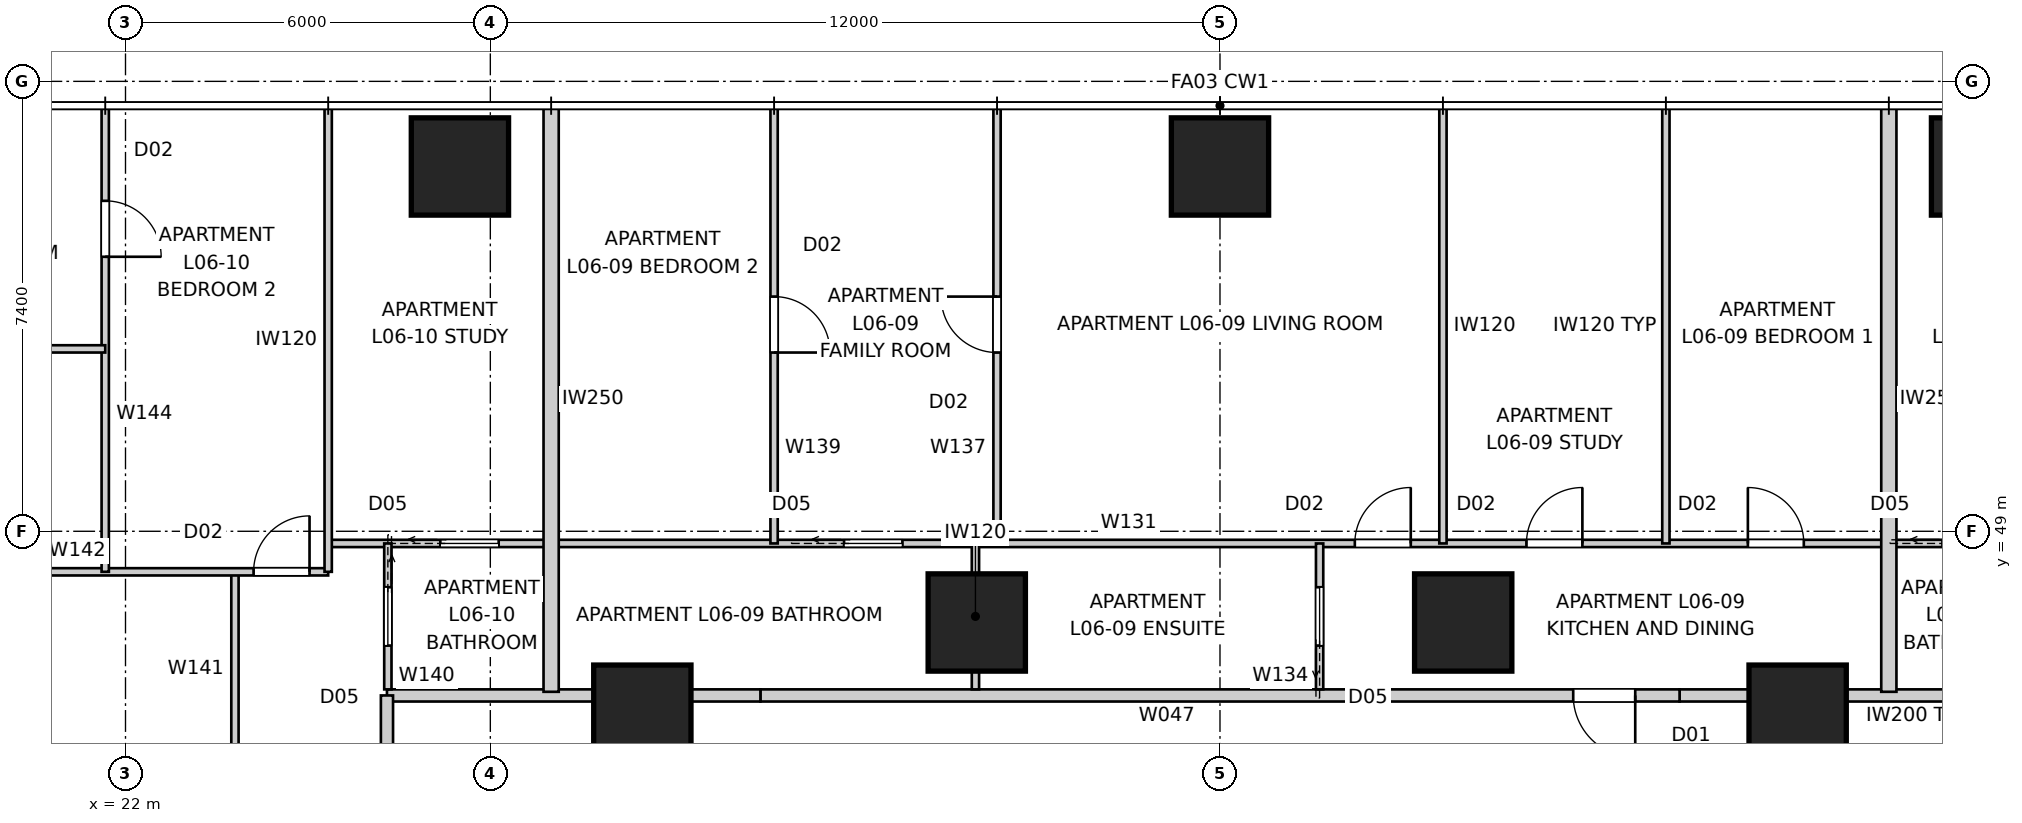
"""IFC4 building model, lengths in metres.
Left out: names, types, materials, properties, quantities, classifications, styles, units other than length and angle.
Written with IfcOpenShell. Run it as: python <this file> out.ifc"""

import sys

from ifc_helpers import new_model, si_unit, direction, frame, frame_2d, origin, origin_2d, place, context, subcontext, project, spatial, rectangle, extrude, element, fill, save


model = new_model("IFC4")
c1 = context("Model", 3, precision=1e-05, world=origin(), true_north=direction((0.0, 1.0)))
c2 = subcontext(c1, "Body", "Model", "MODEL_VIEW")
j1 = project(units=[si_unit("LENGTHUNIT", "METRE"), si_unit("PLANEANGLEUNIT", "RADIAN")], contexts=[c1])
p1 = place(None, origin())
s1 = spatial("IfcSite", under=j1, at=p1, CompositionType="ELEMENT")
p2 = place(p1, origin())
s2 = spatial("IfcBuilding", under=s1, at=p2, CompositionType="ELEMENT")
p3 = place(p2, frame((0.0, 0.0, 25.2)))
s3 = spatial("IfcBuildingStorey", under=s2, at=p3, CompositionType="ELEMENT", Elevation=25.2)
for number, where, z_axis, x_axis in (
    (1, (52.5, 55.0, 0.0), (0.0, 0.0, 1.0), (1.0, 0.0, 0.0)),
    (2, (40.0, 55.0, 0.0), (0.0, 0.0, 1.0), (1.0, 0.0, 0.0)),
    (3, (27.5, 55.0, 0.0), (0.0, 0.0, 1.0), (1.0, 0.0, 0.0)),
    (4, (49.5, 46.0, 0.0), (0.0, 0.0, 1.0), (1.0, 0.0, 0.0)),
    (5, (44.0, 47.5, 0.0), (0.0, 0.0, 1.0), (1.0, 0.0, 0.0)),
    (6, (36.0, 47.5, 0.0), (0.0, 0.0, 1.0), (1.0, 0.0, 0.0)),
    (7, (30.5, 46.0, 0.0), (0.0, 0.0, 1.0), (1.0, 0.0, 0.0)),
):
    element("IfcColumn", number, at=place(p3, frame(where, z_axis=z_axis, x_axis=x_axis)), inside=s3, PredefinedType="COLUMN", context=c2, shape_type="SweptSolid", body=[
        extrude(rectangle(XDim=1.6, YDim=1.6, at=origin_2d()), origin(), (0.0, 0.0, 1.0), 3.4),
    ])
p4 = place(p3, frame((53.7, 46.3, 0.0), z_axis=(0.0, 0.0, 1.0), x_axis=(-1.0, 0.0, 0.0)))
e8 = element("IfcWall", 8, at=p4, inside=s3, PredefinedType="PARTITIONING", context=c2, shape_type="SweptSolid", body=[
    extrude(rectangle(XDim=4.458, YDim=0.2, at=frame_2d((2.229, 0.0))), origin(), (0.0, 0.0, 1.0), 3.25),
])
p5 = place(p3, frame((49.242, 46.3, 0.0), z_axis=(0.0, 0.0, 1.0), x_axis=(-1.0, 0.0, 0.0)))
e9 = element("IfcWall", 9, at=p5, inside=s3, PredefinedType="PARTITIONING", context=c2, shape_type="SweptSolid", body=[
    extrude(rectangle(XDim=1.683, YDim=0.2, at=frame_2d((0.842, 0.0))), origin(), (0.0, 0.0, 1.0), 2.55),
])
p6 = place(p3, frame((47.558, 46.3, 0.0), z_axis=(0.0, 0.0, 1.0), x_axis=(-1.0, 0.0, 0.0)))
e10 = element("IfcWall", 10, at=p6, inside=s3, PredefinedType="PARTITIONING", context=c2, shape_type="SweptSolid", body=[
    extrude(rectangle(XDim=15.117, YDim=0.2, at=frame_2d((7.558, 0.0))), origin(), (0.0, 0.0, 1.0), 3.25),
])
p7 = place(p6, frame((0.729, 0.0, 0.0)))
e11 = element("IfcOpeningElement", 11, at=p7, cuts=e10, PredefinedType="OPENING", context=c2, shape_type="SweptSolid", body=[
    extrude(rectangle(XDim=1.02, YDim=2.34, at=frame_2d((0.51, 1.17))), frame((0.0, 0.11, 0.0), z_axis=(0.0, -1.0, 0.0), x_axis=(1.0, 0.0, 0.0)), (0.0, 0.0, 1.0), 0.22),
])
p8 = place(p3, frame((32.442, 46.3, 0.0), z_axis=(0.0, 0.0, 1.0), x_axis=(-1.0, 0.0, 0.0)))
e12 = element("IfcWall", 12, at=p8, inside=s3, PredefinedType="PARTITIONING", context=c2, shape_type="SweptSolid", body=[
    extrude(rectangle(XDim=1.683, YDim=0.2, at=frame_2d((0.842, 0.0))), origin(), (0.0, 0.0, 1.0), 2.55),
])
p9 = place(p3, frame((30.758, 46.3, 0.0), z_axis=(0.0, 0.0, 1.0), x_axis=(-1.0, 0.0, 0.0)))
e13 = element("IfcWall", 13, at=p9, inside=s3, PredefinedType="PARTITIONING", context=c2, shape_type="SweptSolid", body=[
    extrude(rectangle(XDim=4.458, YDim=0.2, at=frame_2d((2.229, 0.0))), origin(), (0.0, 0.0, 1.0), 3.25),
])
p10 = place(p3, frame((26.3, 46.3, 0.0), z_axis=(0.0, 0.0, 1.0), x_axis=(0.0, -1.0, 0.0)))
e14 = element("IfcWall", 14, at=p10, inside=s3, PredefinedType="PARTITIONING", context=c2, shape_type="SweptSolid", body=[
    extrude(rectangle(XDim=32.6, YDim=0.2, at=frame_2d((16.3, 0.0))), origin(), (0.0, 0.0, 1.0), 3.25),
])
p11 = place(p10, frame((2.315, 0.0, 0.0)))
e15 = element("IfcOpeningElement", 15, at=p11, cuts=e14, PredefinedType="OPENING", context=c2, shape_type="SweptSolid", body=[
    extrude(rectangle(XDim=1.02, YDim=2.34, at=frame_2d((0.51, 1.17))), frame((0.0, 0.11, 0.0), z_axis=(0.0, -1.0, 0.0), x_axis=(1.0, 0.0, 0.0)), (0.0, 0.0, 1.0), 0.22),
])
p12 = place(p10, frame((10.624, 0.0, 0.0)))
e16 = element("IfcOpeningElement", 16, at=p12, cuts=e14, PredefinedType="OPENING", context=c2, shape_type="SweptSolid", body=[
    extrude(rectangle(XDim=1.02, YDim=2.34, at=frame_2d((0.51, 1.17))), frame((0.0, 0.11, 0.0), z_axis=(0.0, -1.0, 0.0), x_axis=(1.0, 0.0, 0.0)), (0.0, 0.0, 1.0), 0.22),
])
p13 = place(p10, frame((17.848, 0.0, 0.0)))
e17 = element("IfcOpeningElement", 17, at=p13, cuts=e14, PredefinedType="OPENING", context=c2, shape_type="SweptSolid", body=[
    extrude(rectangle(XDim=1.02, YDim=2.34, at=frame_2d((0.51, 1.17))), frame((0.0, 0.11, 0.0), z_axis=(0.0, -1.0, 0.0), x_axis=(1.0, 0.0, 0.0)), (0.0, 0.0, 1.0), 0.22),
])
p14 = place(p10, frame((30.516, 0.0, 0.0)))
e18 = element("IfcOpeningElement", 18, at=p14, cuts=e14, PredefinedType="OPENING", context=c2, shape_type="SweptSolid", body=[
    extrude(rectangle(XDim=1.02, YDim=2.34, at=frame_2d((0.51, 1.17))), frame((0.0, 0.11, 0.0), z_axis=(0.0, -1.0, 0.0), x_axis=(1.0, 0.0, 0.0)), (0.0, 0.0, 1.0), 0.22),
])
for number, where, z_axis, x_axis in (
    (19, (51.0, 56.0, 0.0), (0.0, 0.0, 1.0), (0.0, -1.0, 0.0)),
    (20, (29.0, 56.0, 0.0), (0.0, 0.0, 1.0), (0.0, -1.0, 0.0)),
):
    element("IfcWall", number, at=place(p3, frame(where, z_axis=z_axis, x_axis=x_axis)), inside=s3, PredefinedType="PARTITIONING", context=c2, shape_type="SweptSolid", body=[
        extrude(rectangle(XDim=9.64, YDim=0.25, at=frame_2d((4.82, 0.0))), origin(), (0.0, 0.0, 1.0), 3.25),
    ])
p15 = place(p3, frame((25.333, 48.8, 0.0), z_axis=(0.0, 0.0, 1.0), x_axis=(1.0, 0.0, 0.0)))
e21 = element("IfcWall", 21, at=p15, inside=s3, PredefinedType="PARTITIONING", context=c2, shape_type="SweptSolid", body=[
    extrude(rectangle(XDim=29.333, YDim=0.12, at=frame_2d((14.667, 0.0))), origin(), (0.0, 0.0, 1.0), 3.25),
])
p16 = place(p15, frame((19.707, 0.0, 0.0)))
e22 = element("IfcOpeningElement", 22, at=p16, cuts=e21, PredefinedType="OPENING", context=c2, shape_type="SweptSolid", body=[
    extrude(rectangle(XDim=0.92, YDim=2.34, at=frame_2d((0.46, 1.17))), frame((0.0, 0.07, 0.0), z_axis=(0.0, -1.0, 0.0), x_axis=(1.0, 0.0, 0.0)), (0.0, 0.0, 1.0), 0.14),
])
p17 = place(p15, frame((23.348, 0.0, 0.0)))
e23 = element("IfcOpeningElement", 23, at=p17, cuts=e21, PredefinedType="OPENING", context=c2, shape_type="SweptSolid", body=[
    extrude(rectangle(XDim=0.92, YDim=2.34, at=frame_2d((0.46, 1.17))), frame((0.0, 0.07, 0.0), z_axis=(0.0, -1.0, 0.0), x_axis=(1.0, 0.0, 0.0)), (0.0, 0.0, 1.0), 0.14),
])
p18 = place(p15, frame((16.884, 0.0, 0.0)))
e24 = element("IfcOpeningElement", 24, at=p18, cuts=e21, PredefinedType="OPENING", context=c2, shape_type="SweptSolid", body=[
    extrude(rectangle(XDim=0.92, YDim=2.34, at=frame_2d((0.46, 1.17))), frame((0.0, 0.07, 0.0), z_axis=(0.0, -1.0, 0.0), x_axis=(1.0, 0.0, 0.0)), (0.0, 0.0, 1.0), 0.14),
])
p19 = place(p15, frame((26.549, 0.0, 0.0)))
e25 = element("IfcOpeningElement", 25, at=p19, cuts=e21, PredefinedType="OPENING", context=c2, shape_type="SweptSolid", body=[
    extrude(rectangle(XDim=0.96, YDim=2.1, at=frame_2d((0.48, 1.05))), frame((0.0, 0.07, 0.0), z_axis=(0.0, -1.0, 0.0), x_axis=(1.0, 0.0, 0.0)), (0.0, 0.0, 1.0), 0.14),
])
p20 = place(p15, frame((1.844, 0.0, 0.0)))
e26 = element("IfcOpeningElement", 26, at=p20, cuts=e21, PredefinedType="OPENING", context=c2, shape_type="SweptSolid", body=[
    extrude(rectangle(XDim=0.96, YDim=2.1, at=frame_2d((0.48, 1.05))), frame((0.0, 0.07, 0.0), z_axis=(0.0, -1.0, 0.0), x_axis=(1.0, 0.0, 0.0)), (0.0, 0.0, 1.0), 0.14),
])
p21 = place(p15, frame((8.484, 0.0, 0.0)))
e27 = element("IfcOpeningElement", 27, at=p21, cuts=e21, PredefinedType="OPENING", context=c2, shape_type="SweptSolid", body=[
    extrude(rectangle(XDim=0.96, YDim=2.1, at=frame_2d((0.48, 1.05))), frame((0.0, 0.07, 0.0), z_axis=(0.0, -1.0, 0.0), x_axis=(1.0, 0.0, 0.0)), (0.0, 0.0, 1.0), 0.14),
])
p22 = place(p3, frame((41.638, 46.4, 0.0), z_axis=(0.0, 0.0, 1.0), x_axis=(0.0, 1.0, 0.0)))
e28 = element("IfcWall", 28, at=p22, inside=s3, PredefinedType="PARTITIONING", context=c2, shape_type="SweptSolid", body=[
    extrude(rectangle(XDim=2.4, YDim=0.12, at=frame_2d((1.2, 0.0))), origin(), (0.0, 0.0, 1.0), 3.25),
])
p23 = place(p22, frame((0.72, 0.0, 0.0)))
e29 = element("IfcOpeningElement", 29, at=p23, cuts=e28, PredefinedType="OPENING", context=c2, shape_type="SweptSolid", body=[
    extrude(rectangle(XDim=0.96, YDim=2.1, at=frame_2d((0.48, 1.05))), frame((0.0, 0.07, 0.0), z_axis=(0.0, -1.0, 0.0), x_axis=(1.0, 0.0, 0.0)), (0.0, 0.0, 1.0), 0.14),
])
p24 = place(p3, frame((35.978, 48.8, 0.0), z_axis=(0.0, 0.0, 1.0), x_axis=(0.0, -1.0, 0.0)))
e30 = element("IfcWall", 30, at=p24, inside=s3, PredefinedType="PARTITIONING", context=c2, shape_type="SweptSolid", body=[
    extrude(rectangle(XDim=2.4, YDim=0.12, at=frame_2d((1.2, 0.0))), origin(), (0.0, 0.0, 1.0), 3.25),
])
p25 = place(p3, frame((43.667, 55.96, 0.0), z_axis=(0.0, 0.0, 1.0), x_axis=(0.0, -1.0, 0.0)))
e31 = element("IfcWall", 31, at=p25, inside=s3, PredefinedType="PARTITIONING", context=c2, shape_type="SweptSolid", body=[
    extrude(rectangle(XDim=7.16, YDim=0.12, at=frame_2d((3.58, 0.0))), origin(), (0.0, 0.0, 1.0), 3.25),
])
p26 = place(p3, frame((36.333, 48.8, 0.0), z_axis=(0.0, 0.0, 1.0), x_axis=(0.0, 1.0, 0.0)))
e32 = element("IfcWall", 32, at=p26, inside=s3, PredefinedType="PARTITIONING", context=c2, shape_type="SweptSolid", body=[
    extrude(rectangle(XDim=7.16, YDim=0.12, at=frame_2d((3.58, 0.0))), origin(), (0.0, 0.0, 1.0), 3.25),
])
p27 = place(p26, frame((3.14, 0.0, 0.0)))
e33 = element("IfcOpeningElement", 33, at=p27, cuts=e32, PredefinedType="OPENING", context=c2, shape_type="SweptSolid", body=[
    extrude(rectangle(XDim=0.92, YDim=2.34, at=frame_2d((0.46, 1.17))), frame((0.0, 0.07, 0.0), z_axis=(0.0, -1.0, 0.0), x_axis=(1.0, 0.0, 0.0)), (0.0, 0.0, 1.0), 0.14),
])
p28 = place(p3, frame((47.333, 48.8, 0.0), z_axis=(0.0, 0.0, 1.0), x_axis=(0.0, 1.0, 0.0)))
e34 = element("IfcWall", 34, at=p28, inside=s3, PredefinedType="PARTITIONING", context=c2, shape_type="SweptSolid", body=[
    extrude(rectangle(XDim=7.16, YDim=0.12, at=frame_2d((3.58, 0.0))), origin(), (0.0, 0.0, 1.0), 3.25),
])
p29 = place(p3, frame((32.667, 55.96, 0.0), z_axis=(0.0, 0.0, 1.0), x_axis=(0.0, -1.0, 0.0)))
e35 = element("IfcWall", 35, at=p29, inside=s3, PredefinedType="PARTITIONING", context=c2, shape_type="SweptSolid", body=[
    extrude(rectangle(XDim=7.16, YDim=0.12, at=frame_2d((3.58, 0.0))), origin(), (0.0, 0.0, 1.0), 3.25),
])
p30 = place(p29, frame((3.1, 0.0, 0.0)))
e36 = element("IfcOpeningElement", 36, at=p30, cuts=e35, PredefinedType="OPENING", context=c2, shape_type="SweptSolid", body=[
    extrude(rectangle(XDim=0.92, YDim=2.34, at=frame_2d((0.46, 1.17))), frame((0.0, 0.07, 0.0), z_axis=(0.0, -1.0, 0.0), x_axis=(1.0, 0.0, 0.0)), (0.0, 0.0, 1.0), 0.14),
])
p31 = place(p3, frame((26.315, 48.8, 0.0), z_axis=(0.0, 0.0, 1.0), x_axis=(0.0, -1.0, 0.0)))
e37 = element("IfcWall", 37, at=p31, inside=s3, PredefinedType="PARTITIONING", context=c2, shape_type="SweptSolid", body=[
    extrude(rectangle(XDim=2.4, YDim=0.12, at=frame_2d((1.2, 0.0))), origin(), (0.0, 0.0, 1.0), 3.25),
])
p32 = place(p31, frame((0.72, 0.0, 0.0)))
e38 = element("IfcOpeningElement", 38, at=p32, cuts=e37, PredefinedType="OPENING", context=c2, shape_type="SweptSolid", body=[
    extrude(rectangle(XDim=0.96, YDim=2.1, at=frame_2d((0.48, 1.05))), frame((0.0, 0.07, 0.0), z_axis=(0.0, -1.0, 0.0), x_axis=(1.0, 0.0, 0.0)), (0.0, 0.0, 1.0), 0.14),
])
p33 = place(p3, frame((23.8, 41.0, 0.0), z_axis=(0.0, 0.0, 1.0), x_axis=(0.0, 1.0, 0.0)))
e39 = element("IfcWall", 39, at=p33, inside=s3, PredefinedType="PARTITIONING", context=c2, shape_type="SweptSolid", body=[
    extrude(rectangle(XDim=7.333, YDim=0.12, at=frame_2d((3.667, 0.0))), origin(), (0.0, 0.0, 1.0), 3.25),
])
p34 = place(p33, frame((3.207, 0.0, 0.0)))
e40 = element("IfcOpeningElement", 40, at=p34, cuts=e39, PredefinedType="OPENING", context=c2, shape_type="SweptSolid", body=[
    extrude(rectangle(XDim=0.92, YDim=2.34, at=frame_2d((0.46, 1.17))), frame((0.0, 0.07, 0.0), z_axis=(0.0, -1.0, 0.0), x_axis=(1.0, 0.0, 0.0)), (0.0, 0.0, 1.0), 0.14),
])
p35 = place(p3, frame((14.04, 48.333, 0.0), z_axis=(0.0, 0.0, 1.0), x_axis=(1.0, 0.0, 0.0)))
e41 = element("IfcWall", 41, at=p35, inside=s3, PredefinedType="PARTITIONING", context=c2, shape_type="SweptSolid", body=[
    extrude(rectangle(XDim=11.293, YDim=0.12, at=frame_2d((5.646, 0.0))), origin(), (0.0, 0.0, 1.0), 3.25),
])
p36 = place(p35, frame((10.067, 0.0, 0.0)))
e42 = element("IfcOpeningElement", 42, at=p36, cuts=e41, PredefinedType="OPENING", context=c2, shape_type="SweptSolid", body=[
    extrude(rectangle(XDim=0.92, YDim=2.34, at=frame_2d((0.46, 1.17))), frame((0.0, 0.07, 0.0), z_axis=(0.0, -1.0, 0.0), x_axis=(1.0, 0.0, 0.0)), (0.0, 0.0, 1.0), 0.14),
])
p37 = place(p35, frame((3.358, 0.0, 0.0)))
e43 = element("IfcOpeningElement", 43, at=p37, cuts=e41, PredefinedType="OPENING", context=c2, shape_type="SweptSolid", body=[
    extrude(rectangle(XDim=0.92, YDim=2.34, at=frame_2d((0.46, 1.17))), frame((0.0, 0.07, 0.0), z_axis=(0.0, -1.0, 0.0), x_axis=(1.0, 0.0, 0.0)), (0.0, 0.0, 1.0), 0.14),
])
p38 = place(p3, frame((25.333, 48.333, 0.0), z_axis=(0.0, 0.0, 1.0), x_axis=(0.0, 1.0, 0.0)))
e44 = element("IfcWall", 44, at=p38, inside=s3, PredefinedType="PARTITIONING", context=c2, shape_type="SweptSolid", body=[
    extrude(rectangle(XDim=7.627, YDim=0.12, at=frame_2d((3.813, 0.0))), origin(), (0.0, 0.0, 1.0), 2.637),
])
p39 = place(p3, frame((21.667, 55.96, 0.0), z_axis=(0.0, 0.0, 1.0), x_axis=(0.0, -1.0, 0.0)))
e45 = element("IfcWall", 45, at=p39, inside=s3, PredefinedType="PARTITIONING", context=c2, shape_type="SweptSolid", body=[
    extrude(rectangle(XDim=7.627, YDim=0.12, at=frame_2d((3.813, 0.0))), origin(), (0.0, 0.0, 1.0), 3.25),
])
p40 = place(p39, frame((1.525, 0.0, 0.0)))
e46 = element("IfcOpeningElement", 46, at=p40, cuts=e45, PredefinedType="OPENING", context=c2, shape_type="SweptSolid", body=[
    extrude(rectangle(XDim=0.92, YDim=2.34, at=frame_2d((0.46, 1.17))), frame((0.0, 0.07, 0.0), z_axis=(0.0, -1.0, 0.0), x_axis=(1.0, 0.0, 0.0)), (0.0, 0.0, 1.0), 0.14),
])
p41 = place(p3, frame((18.04, 52.0, 0.0), z_axis=(0.0, 0.0, 1.0), x_axis=(1.0, 0.0, 0.0)))
e47 = element("IfcWall", 47, at=p41, inside=s3, PredefinedType="PARTITIONING", context=c2, shape_type="SweptSolid", body=[
    extrude(rectangle(XDim=3.627, YDim=0.12, at=frame_2d((1.813, 0.0))), origin(), (0.0, 0.0, 1.0), 3.25),
])
p42 = place(p7, origin())
e48 = element("IfcDoor", 48, at=p42, inside=s3, OperationType="SINGLE_SWING_LEFT", PredefinedType="DOOR", context=c2, shape_type="SweptSolid", body=[
    extrude(rectangle(XDim=1.02, YDim=2.34, at=frame_2d((0.51, 1.17))), frame((0.0, 0.025, 0.0), z_axis=(0.0, -1.0, 0.0), x_axis=(1.0, 0.0, 0.0)), (0.0, 0.0, 1.0), 0.05),
])
fill(e11, e48)
p43 = place(p16, origin())
e49 = element("IfcDoor", 49, at=p43, inside=s3, OperationType="SINGLE_SWING_RIGHT", PredefinedType="DOOR", context=c2, shape_type="SweptSolid", body=[
    extrude(rectangle(XDim=0.92, YDim=2.34, at=frame_2d((0.46, 1.17))), frame((0.0, 0.025, 0.0), z_axis=(0.0, -1.0, 0.0), x_axis=(1.0, 0.0, 0.0)), (0.0, 0.0, 1.0), 0.05),
])
fill(e22, e49)
p44 = place(p17, origin())
e50 = element("IfcDoor", 50, at=p44, inside=s3, OperationType="SINGLE_SWING_LEFT", PredefinedType="DOOR", context=c2, shape_type="SweptSolid", body=[
    extrude(rectangle(XDim=0.92, YDim=2.34, at=frame_2d((0.46, 1.17))), frame((0.0, 0.025, 0.0), z_axis=(0.0, -1.0, 0.0), x_axis=(1.0, 0.0, 0.0)), (0.0, 0.0, 1.0), 0.05),
])
fill(e23, e50)
p45 = place(p23, origin())
e51 = element("IfcDoor", 51, at=p45, inside=s3, OperationType="SLIDING_TO_LEFT", PredefinedType="DOOR", context=c2, shape_type="SweptSolid", body=[
    extrude(rectangle(XDim=0.96, YDim=2.1, at=frame_2d((0.48, 1.05))), frame((0.0, 0.025, 0.0), z_axis=(0.0, -1.0, 0.0), x_axis=(1.0, 0.0, 0.0)), (0.0, 0.0, 1.0), 0.05),
])
fill(e29, e51)
p46 = place(p18, origin())
e52 = element("IfcDoor", 52, at=p46, inside=s3, OperationType="SINGLE_SWING_RIGHT", PredefinedType="DOOR", context=c2, shape_type="SweptSolid", body=[
    extrude(rectangle(XDim=0.92, YDim=2.34, at=frame_2d((0.46, 1.17))), frame((0.0, 0.025, 0.0), z_axis=(0.0, -1.0, 0.0), x_axis=(1.0, 0.0, 0.0)), (0.0, 0.0, 1.0), 0.05),
])
fill(e24, e52)
p47 = place(p32, origin())
e53 = element("IfcDoor", 53, at=p47, inside=s3, OperationType="SLIDING_TO_LEFT", PredefinedType="DOOR", context=c2, shape_type="SweptSolid", body=[
    extrude(rectangle(XDim=0.96, YDim=2.1, at=frame_2d((0.48, 1.05))), frame((0.0, 0.025, 0.0), z_axis=(0.0, -1.0, 0.0), x_axis=(1.0, 0.0, 0.0)), (0.0, 0.0, 1.0), 0.05),
])
fill(e38, e53)
p48 = place(p36, origin())
e54 = element("IfcDoor", 54, at=p48, inside=s3, OperationType="SINGLE_SWING_RIGHT", PredefinedType="DOOR", context=c2, shape_type="SweptSolid", body=[
    extrude(rectangle(XDim=0.92, YDim=2.34, at=frame_2d((0.46, 1.17))), frame((0.0, 0.025, 0.0), z_axis=(0.0, -1.0, 0.0), x_axis=(1.0, 0.0, 0.0)), (0.0, 0.0, 1.0), 0.05),
])
fill(e42, e54)
p49 = place(p27, origin())
e55 = element("IfcDoor", 55, at=p49, inside=s3, OperationType="SINGLE_SWING_RIGHT", PredefinedType="DOOR", context=c2, shape_type="SweptSolid", body=[
    extrude(rectangle(XDim=0.92, YDim=2.34, at=frame_2d((0.46, 1.17))), frame((0.0, 0.025, 0.0), z_axis=(0.0, -1.0, 0.0), x_axis=(1.0, 0.0, 0.0)), (0.0, 0.0, 1.0), 0.05),
])
fill(e33, e55)
p50 = place(p20, origin())
e56 = element("IfcDoor", 56, at=p50, inside=s3, OperationType="SLIDING_TO_LEFT", PredefinedType="DOOR", context=c2, shape_type="SweptSolid", body=[
    extrude(rectangle(XDim=0.96, YDim=2.1, at=frame_2d((0.48, 1.05))), frame((0.0, 0.025, 0.0), z_axis=(0.0, -1.0, 0.0), x_axis=(1.0, 0.0, 0.0)), (0.0, 0.0, 1.0), 0.05),
])
fill(e26, e56)
p51 = place(p30, origin())
e57 = element("IfcDoor", 57, at=p51, inside=s3, OperationType="SINGLE_SWING_RIGHT", PredefinedType="DOOR", context=c2, shape_type="SweptSolid", body=[
    extrude(rectangle(XDim=0.92, YDim=2.34, at=frame_2d((0.46, 1.17))), frame((0.0, 0.025, 0.0), z_axis=(0.0, -1.0, 0.0), x_axis=(1.0, 0.0, 0.0)), (0.0, 0.0, 1.0), 0.05),
])
fill(e36, e57)
p52 = place(p21, origin())
e58 = element("IfcDoor", 58, at=p52, inside=s3, OperationType="SLIDING_TO_LEFT", PredefinedType="DOOR", context=c2, shape_type="SweptSolid", body=[
    extrude(rectangle(XDim=0.96, YDim=2.1, at=frame_2d((0.48, 1.05))), frame((0.0, 0.025, 0.0), z_axis=(0.0, -1.0, 0.0), x_axis=(1.0, 0.0, 0.0)), (0.0, 0.0, 1.0), 0.05),
])
fill(e27, e58)
p53 = place(p40, origin())
e59 = element("IfcDoor", 59, at=p53, inside=s3, OperationType="SINGLE_SWING_RIGHT", PredefinedType="DOOR", context=c2, shape_type="SweptSolid", body=[
    extrude(rectangle(XDim=0.92, YDim=2.34, at=frame_2d((0.46, 1.17))), frame((0.0, 0.025, 0.0), z_axis=(0.0, -1.0, 0.0), x_axis=(1.0, 0.0, 0.0)), (0.0, 0.0, 1.0), 0.05),
])
fill(e46, e59)
save(model, sys.argv[1])
